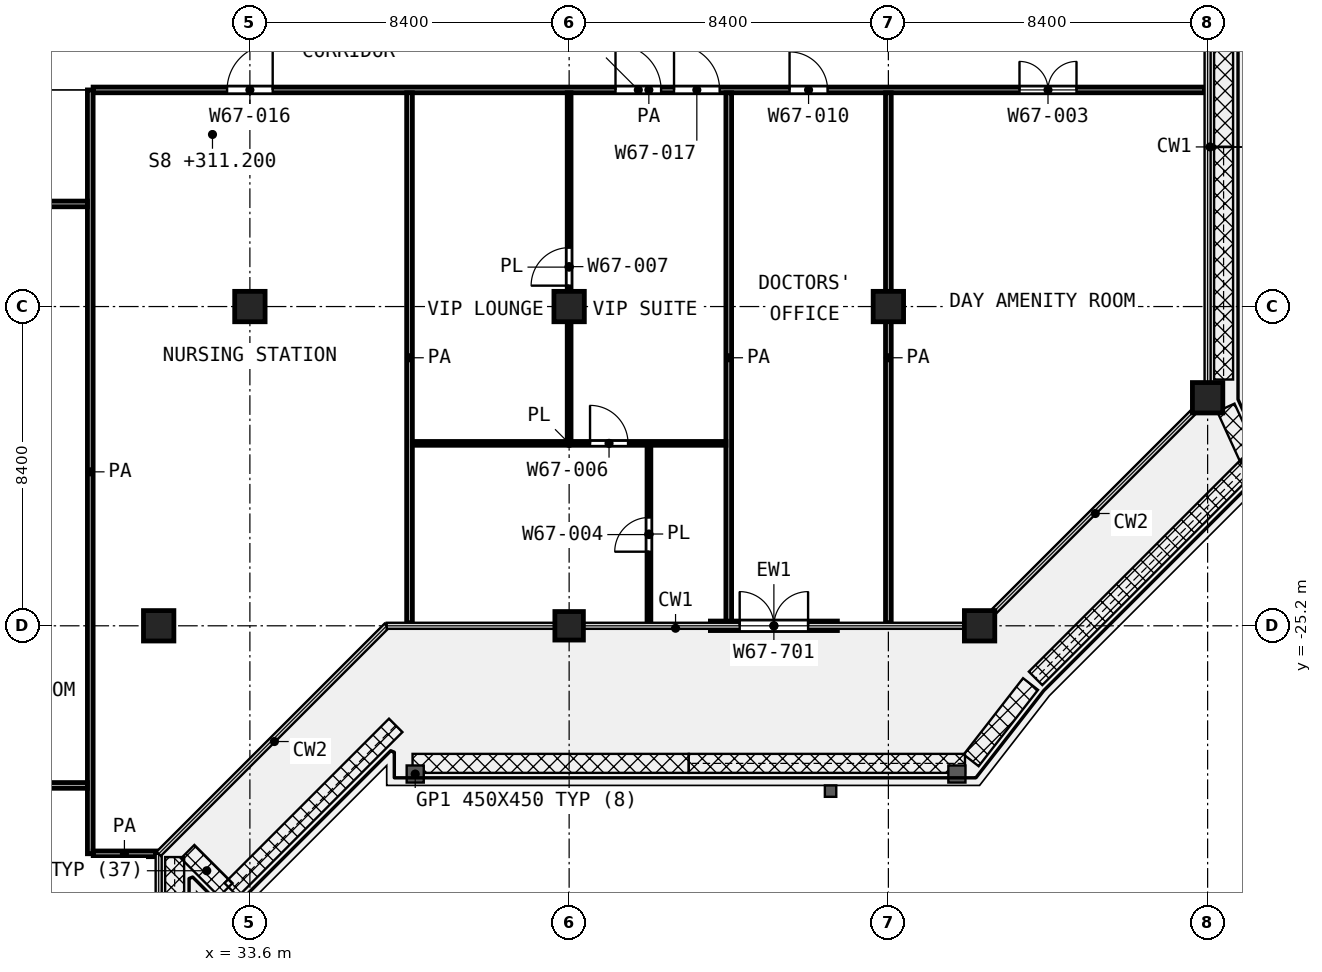
"""IFC4 building model, lengths in metres.
Left out: names, types, materials, properties, quantities, classifications, styles, units other than length and angle.
Written with IfcOpenShell. Run it as: python <this file> out.ifc"""

import sys

from ifc_helpers import new_model, si_unit, direction, frame, frame_2d, origin, origin_2d, place, context, subcontext, project, spatial, rectangle, extrude, element, fill, save


model = new_model("IFC4")
c1 = context("Model", 3, precision=1e-05, world=origin(), true_north=direction((0.0, 1.0)))
c2 = subcontext(c1, "Body", "Model", "MODEL_VIEW")
j1 = project(units=[si_unit("LENGTHUNIT", "METRE"), si_unit("PLANEANGLEUNIT", "RADIAN")], contexts=[c1])
p1 = place(None, origin())
s1 = spatial("IfcSite", under=j1, at=p1, CompositionType="ELEMENT")
p2 = place(p1, origin())
s2 = spatial("IfcBuilding", under=s1, at=p2, CompositionType="ELEMENT")
p3 = place(p2, frame((0.0, 0.0, 311.2)))
s3 = spatial("IfcBuildingStorey", under=s2, at=p3, CompositionType="ELEMENT", Elevation=311.2)
for number, where, z_axis, x_axis in (
    (1, (33.6, -16.8, 0.0), (0.0, 0.0, 1.0), (1.0, 0.0, 0.0)),
    (2, (42.0, -16.8, 0.0), (0.0, 0.0, 1.0), (1.0, 0.0, 0.0)),
    (3, (50.4, -16.8, 0.0), (0.0, 0.0, 1.0), (1.0, 0.0, 0.0)),
    (4, (58.8, -19.2, 0.0), (0.0, 0.0, 1.0), (1.0, 0.0, 0.0)),
    (5, (31.2, -25.2, 0.0), (0.0, 0.0, 1.0), (1.0, 0.0, 0.0)),
):
    element("IfcColumn", number, at=place(p3, frame(where, z_axis=z_axis, x_axis=x_axis)), inside=s3, PredefinedType="COLUMN", context=c2, shape_type="SweptSolid", body=[
        extrude(rectangle(XDim=0.8, YDim=0.8, at=origin_2d()), origin(), (0.0, 0.0, 1.0), 4.2),
    ])
p4 = place(p3, frame((42.0, -25.2, 0.0), z_axis=(0.0, 0.0, 1.0), x_axis=(1.0, 0.0, 0.0)))
e6 = element("IfcColumn", 6, at=p4, inside=s3, PredefinedType="COLUMN", context=c2, shape_type="SweptSolid", body=[
    extrude(rectangle(XDim=0.75, YDim=0.75, at=origin_2d()), origin(), (0.0, 0.0, 1.0), 4.2),
])
p5 = place(p3, frame((52.8, -25.2, 0.0), z_axis=(0.0, 0.0, 1.0), x_axis=(1.0, 0.0, 0.0)))
e7 = element("IfcColumn", 7, at=p5, inside=s3, PredefinedType="COLUMN", context=c2, shape_type="SweptSolid", body=[
    extrude(rectangle(XDim=0.8, YDim=0.8, at=origin_2d()), origin(), (0.0, 0.0, 1.0), 4.2),
])
p6 = place(p3, frame((45.717, -25.2, 0.0), z_axis=(0.0, 0.0, 1.0), x_axis=(1.0, 0.0, 0.0)))
e8 = element("IfcWall", 8, at=p6, inside=s3, PredefinedType="SOLIDWALL", context=c2, shape_type="SweptSolid", body=[
    extrude(rectangle(XDim=3.342, YDim=0.25, at=frame_2d((1.671, 0.0))), origin(), (0.0, 0.0, 1.0), 3.48),
])
p7 = place(p6, frame((0.771, 0.0, 0.0)))
e9 = element("IfcOpeningElement", 9, at=p7, cuts=e8, PredefinedType="OPENING", context=c2, shape_type="SweptSolid", body=[
    extrude(rectangle(XDim=1.8, YDim=2.1, at=frame_2d((0.9, 1.05))), frame((0.0, 0.135, 0.0), z_axis=(0.0, -1.0, 0.0), x_axis=(1.0, 0.0, 0.0)), (0.0, 0.0, 1.0), 0.27),
])
p8 = place(p3, frame((37.875, -20.4, 0.0), z_axis=(0.0, 0.0, 1.0), x_axis=(1.0, 0.0, 0.0)))
e10 = element("IfcWall", 10, at=p8, inside=s3, PredefinedType="PARTITIONING", context=c2, shape_type="SweptSolid", body=[
    extrude(rectangle(XDim=8.25, YDim=0.1, at=frame_2d((4.125, 0.0))), origin(), (0.0, 0.0, 1.0), 3.6),
])
p9 = place(p8, frame((4.675, 0.0, 0.0)))
e11 = element("IfcOpeningElement", 11, at=p9, cuts=e10, PredefinedType="OPENING", context=c2, shape_type="SweptSolid", body=[
    extrude(rectangle(XDim=1.0, YDim=2.1, at=frame_2d((0.5, 1.05))), frame((0.0, 0.06, 0.0), z_axis=(0.0, -1.0, 0.0), x_axis=(1.0, 0.0, 0.0)), (0.0, 0.0, 1.0), 0.12),
])
p10 = place(p3, frame((42.0, -20.35, 0.0), z_axis=(0.0, 0.0, 1.0), x_axis=(0.0, 1.0, 0.0)))
e12 = element("IfcWall", 12, at=p10, inside=s3, PredefinedType="PARTITIONING", context=c2, shape_type="SweptSolid", body=[
    extrude(rectangle(XDim=9.175, YDim=0.1, at=frame_2d((4.587, 0.0))), origin(), (0.0, 0.0, 1.0), 3.6),
])
p11 = place(p10, frame((4.1, 0.0, 0.0)))
e13 = element("IfcOpeningElement", 13, at=p11, cuts=e12, PredefinedType="OPENING", context=c2, shape_type="SweptSolid", body=[
    extrude(rectangle(XDim=1.0, YDim=2.1, at=frame_2d((0.5, 1.05))), frame((0.0, 0.06, 0.0), z_axis=(0.0, -1.0, 0.0), x_axis=(1.0, 0.0, 0.0)), (0.0, 0.0, 1.0), 0.12),
])
p12 = place(p3, frame((44.1, -25.12, 0.0), z_axis=(0.0, 0.0, 1.0), x_axis=(0.0, 1.0, 0.0)))
e14 = element("IfcWall", 14, at=p12, inside=s3, PredefinedType="PARTITIONING", context=c2, shape_type="SweptSolid", body=[
    extrude(rectangle(XDim=4.67, YDim=0.1, at=frame_2d((2.335, 0.0))), origin(), (0.0, 0.0, 1.0), 3.6),
])
p13 = place(p12, frame((1.87, 0.0, 0.0)))
e15 = element("IfcOpeningElement", 15, at=p13, cuts=e14, PredefinedType="OPENING", context=c2, shape_type="SweptSolid", body=[
    extrude(rectangle(XDim=0.9, YDim=2.1, at=frame_2d((0.45, 1.05))), frame((0.0, 0.06, 0.0), z_axis=(0.0, -1.0, 0.0), x_axis=(1.0, 0.0, 0.0)), (0.0, 0.0, 1.0), 0.12),
])
p14 = place(p3, frame((29.477, -31.2, 0.0), z_axis=(0.0, 0.0, 1.0), x_axis=(1.0, 0.0, 0.0)))
e16 = element("IfcWall", 16, at=p14, inside=s3, PredefinedType="PARTITIONING", context=c2, shape_type="SweptSolid", body=[
    extrude(rectangle(XDim=1.643, YDim=0.15, at=frame_2d((0.822, 0.0))), origin(), (0.0, 0.0, 1.0), 3.6),
])
p15 = place(p3, frame((11.175, -29.4, 0.0), z_axis=(0.0, 0.0, 1.0), x_axis=(1.0, 0.0, 0.0)))
e17 = element("IfcWall", 17, at=p15, inside=s3, PredefinedType="PARTITIONING", context=c2, shape_type="SweptSolid", body=[
    extrude(rectangle(XDim=18.15, YDim=0.15, at=frame_2d((9.075, 0.0))), origin(), (0.0, 0.0, 1.0), 3.6),
])
p16 = place(p3, frame((24.7, -14.1, 0.0), z_axis=(0.0, 0.0, 1.0), x_axis=(1.0, 0.0, 0.0)))
e18 = element("IfcWall", 18, at=p16, inside=s3, PredefinedType="PARTITIONING", context=c2, shape_type="SweptSolid", body=[
    extrude(rectangle(XDim=4.625, YDim=0.15, at=frame_2d((2.312, 0.0))), origin(), (0.0, 0.0, 1.0), 3.6),
])
p17 = place(p16, frame((1.85, 0.0, 0.0)))
e19 = element("IfcOpeningElement", 19, at=p17, cuts=e18, PredefinedType="OPENING", context=c2, shape_type="SweptSolid", body=[
    extrude(rectangle(XDim=1.5, YDim=2.1, at=frame_2d((0.75, 1.05))), frame((0.0, 0.085, 0.0), z_axis=(0.0, -1.0, 0.0), x_axis=(1.0, 0.0, 0.0)), (0.0, 0.0, 1.0), 0.17),
])
p18 = place(p3, frame((29.475, -11.1, 0.0), z_axis=(0.0, 0.0, 1.0), x_axis=(1.0, 0.0, 0.0)))
e20 = element("IfcWall", 20, at=p18, inside=s3, PredefinedType="PARTITIONING", context=c2, shape_type="SweptSolid", body=[
    extrude(rectangle(XDim=29.245, YDim=0.15, at=frame_2d((14.623, 0.0))), origin(), (0.0, 0.0, 1.0), 3.6),
])
p19 = place(p18, frame((3.525, 0.0, 0.0)))
e21 = element("IfcOpeningElement", 21, at=p19, cuts=e20, PredefinedType="OPENING", context=c2, shape_type="SweptSolid", body=[
    extrude(rectangle(XDim=1.2, YDim=2.1, at=frame_2d((0.6, 1.05))), frame((0.0, 0.085, 0.0), z_axis=(0.0, -1.0, 0.0), x_axis=(1.0, 0.0, 0.0)), (0.0, 0.0, 1.0), 0.17),
])
p20 = place(p18, frame((15.285, 0.0, 0.0)))
e22 = element("IfcOpeningElement", 22, at=p20, cuts=e20, PredefinedType="OPENING", context=c2, shape_type="SweptSolid", body=[
    extrude(rectangle(XDim=1.2, YDim=2.1, at=frame_2d((0.6, 1.05))), frame((0.0, 0.085, 0.0), z_axis=(0.0, -1.0, 0.0), x_axis=(1.0, 0.0, 0.0)), (0.0, 0.0, 1.0), 0.17),
])
p21 = place(p18, frame((13.745, 0.0, 0.0)))
e23 = element("IfcOpeningElement", 23, at=p21, cuts=e20, PredefinedType="OPENING", context=c2, shape_type="SweptSolid", body=[
    extrude(rectangle(XDim=1.2, YDim=2.1, at=frame_2d((0.6, 1.05))), frame((0.0, 0.085, 0.0), z_axis=(0.0, -1.0, 0.0), x_axis=(1.0, 0.0, 0.0)), (0.0, 0.0, 1.0), 0.17),
])
p22 = place(p18, frame((18.325, 0.0, 0.0)))
e24 = element("IfcOpeningElement", 24, at=p22, cuts=e20, PredefinedType="OPENING", context=c2, shape_type="SweptSolid", body=[
    extrude(rectangle(XDim=1.0, YDim=2.1, at=frame_2d((0.5, 1.05))), frame((0.0, 0.085, 0.0), z_axis=(0.0, -1.0, 0.0), x_axis=(1.0, 0.0, 0.0)), (0.0, 0.0, 1.0), 0.17),
])
p23 = place(p18, frame((24.375, 0.0, 0.0)))
e25 = element("IfcOpeningElement", 25, at=p23, cuts=e20, PredefinedType="OPENING", context=c2, shape_type="SweptSolid", body=[
    extrude(rectangle(XDim=1.5, YDim=2.1, at=frame_2d((0.75, 1.05))), frame((0.0, 0.085, 0.0), z_axis=(0.0, -1.0, 0.0), x_axis=(1.0, 0.0, 0.0)), (0.0, 0.0, 1.0), 0.17),
])
p24 = place(p3, frame((29.4, -31.198, 0.0), z_axis=(0.0, 0.0, 1.0), x_axis=(0.0, 1.0, 0.0)))
e26 = element("IfcWall", 26, at=p24, inside=s3, PredefinedType="PARTITIONING", context=c2, shape_type="SweptSolid", body=[
    extrude(rectangle(XDim=20.098, YDim=0.15, at=frame_2d((10.049, 0.0))), origin(), (0.0, 0.0, 1.0), 3.6),
])
for number, where, z_axis, x_axis in (
    (27, (37.8, -25.12, 0.0), (0.0, 0.0, 1.0), (0.0, 1.0, 0.0)),
    (28, (46.2, -25.12, 0.0), (0.0, 0.0, 1.0), (0.0, 1.0, 0.0)),
    (29, (50.4, -25.12, 0.0), (0.0, 0.0, 1.0), (0.0, 1.0, 0.0)),
):
    element("IfcWall", number, at=place(p3, frame(where, z_axis=z_axis, x_axis=x_axis)), inside=s3, PredefinedType="PARTITIONING", context=c2, shape_type="SweptSolid", body=[
        extrude(rectangle(XDim=13.945, YDim=0.15, at=frame_2d((6.973, 0.0))), origin(), (0.0, 0.0, 1.0), 3.6),
    ])
p25 = place(p7, origin())
e30 = element("IfcDoor", 30, at=p25, inside=s3, OperationType="DOUBLE_DOOR_SINGLE_SWING", PredefinedType="DOOR", context=c2, shape_type="SweptSolid", body=[
    extrude(rectangle(XDim=1.8, YDim=2.1, at=frame_2d((0.9, 1.05))), frame((0.0, 0.025, 0.0), z_axis=(0.0, -1.0, 0.0), x_axis=(1.0, 0.0, 0.0)), (0.0, 0.0, 1.0), 0.05),
])
fill(e9, e30)
p26 = place(p19, origin())
e31 = element("IfcDoor", 31, at=p26, inside=s3, OperationType="SINGLE_SWING_RIGHT", PredefinedType="DOOR", context=c2, shape_type="SweptSolid", body=[
    extrude(rectangle(XDim=1.2, YDim=2.1, at=frame_2d((0.6, 1.05))), frame((0.0, 0.025, 0.0), z_axis=(0.0, -1.0, 0.0), x_axis=(1.0, 0.0, 0.0)), (0.0, 0.0, 1.0), 0.05),
])
fill(e21, e31)
p27 = place(p20, origin())
e32 = element("IfcDoor", 32, at=p27, inside=s3, OperationType="SINGLE_SWING_LEFT", PredefinedType="DOOR", context=c2, shape_type="SweptSolid", body=[
    extrude(rectangle(XDim=1.2, YDim=2.1, at=frame_2d((0.6, 1.05))), frame((0.0, 0.025, 0.0), z_axis=(0.0, -1.0, 0.0), x_axis=(1.0, 0.0, 0.0)), (0.0, 0.0, 1.0), 0.05),
])
fill(e22, e32)
p28 = place(p21, origin())
e33 = element("IfcDoor", 33, at=p28, inside=s3, OperationType="SINGLE_SWING_LEFT", PredefinedType="DOOR", context=c2, shape_type="SweptSolid", body=[
    extrude(rectangle(XDim=1.2, YDim=2.1, at=frame_2d((0.6, 1.05))), frame((0.0, 0.025, 0.0), z_axis=(0.0, -1.0, 0.0), x_axis=(1.0, 0.0, 0.0)), (0.0, 0.0, 1.0), 0.05),
])
fill(e23, e33)
p29 = place(p9, origin())
e34 = element("IfcDoor", 34, at=p29, inside=s3, OperationType="SINGLE_SWING_LEFT", PredefinedType="DOOR", context=c2, shape_type="SweptSolid", body=[
    extrude(rectangle(XDim=1.0, YDim=2.1, at=frame_2d((0.5, 1.05))), frame((0.0, 0.025, 0.0), z_axis=(0.0, -1.0, 0.0), x_axis=(1.0, 0.0, 0.0)), (0.0, 0.0, 1.0), 0.05),
])
fill(e11, e34)
p30 = place(p11, origin())
e35 = element("IfcDoor", 35, at=p30, inside=s3, OperationType="SINGLE_SWING_LEFT", PredefinedType="DOOR", context=c2, shape_type="SweptSolid", body=[
    extrude(rectangle(XDim=1.0, YDim=2.1, at=frame_2d((0.5, 1.05))), frame((0.0, 0.025, 0.0), z_axis=(0.0, -1.0, 0.0), x_axis=(1.0, 0.0, 0.0)), (0.0, 0.0, 1.0), 0.05),
])
fill(e13, e35)
p31 = place(p13, origin())
e36 = element("IfcDoor", 36, at=p31, inside=s3, OperationType="SINGLE_SWING_LEFT", PredefinedType="DOOR", context=c2, shape_type="SweptSolid", body=[
    extrude(rectangle(XDim=0.9, YDim=2.1, at=frame_2d((0.45, 1.05))), frame((0.0, 0.025, 0.0), z_axis=(0.0, -1.0, 0.0), x_axis=(1.0, 0.0, 0.0)), (0.0, 0.0, 1.0), 0.05),
])
fill(e15, e36)
p32 = place(p22, origin())
e37 = element("IfcDoor", 37, at=p32, inside=s3, OperationType="SINGLE_SWING_LEFT", PredefinedType="DOOR", context=c2, shape_type="SweptSolid", body=[
    extrude(rectangle(XDim=1.0, YDim=2.1, at=frame_2d((0.5, 1.05))), frame((0.0, 0.025, 0.0), z_axis=(0.0, -1.0, 0.0), x_axis=(1.0, 0.0, 0.0)), (0.0, 0.0, 1.0), 0.05),
])
fill(e24, e37)
p33 = place(p23, origin())
e38 = element("IfcDoor", 38, at=p33, inside=s3, OperationType="DOUBLE_DOOR_SINGLE_SWING", PredefinedType="DOOR", context=c2, shape_type="SweptSolid", body=[
    extrude(rectangle(XDim=1.5, YDim=2.1, at=frame_2d((0.75, 1.05))), frame((0.0, 0.025, 0.0), z_axis=(0.0, -1.0, 0.0), x_axis=(1.0, 0.0, 0.0)), (0.0, 0.0, 1.0), 0.05),
])
fill(e25, e38)
save(model, sys.argv[1])
